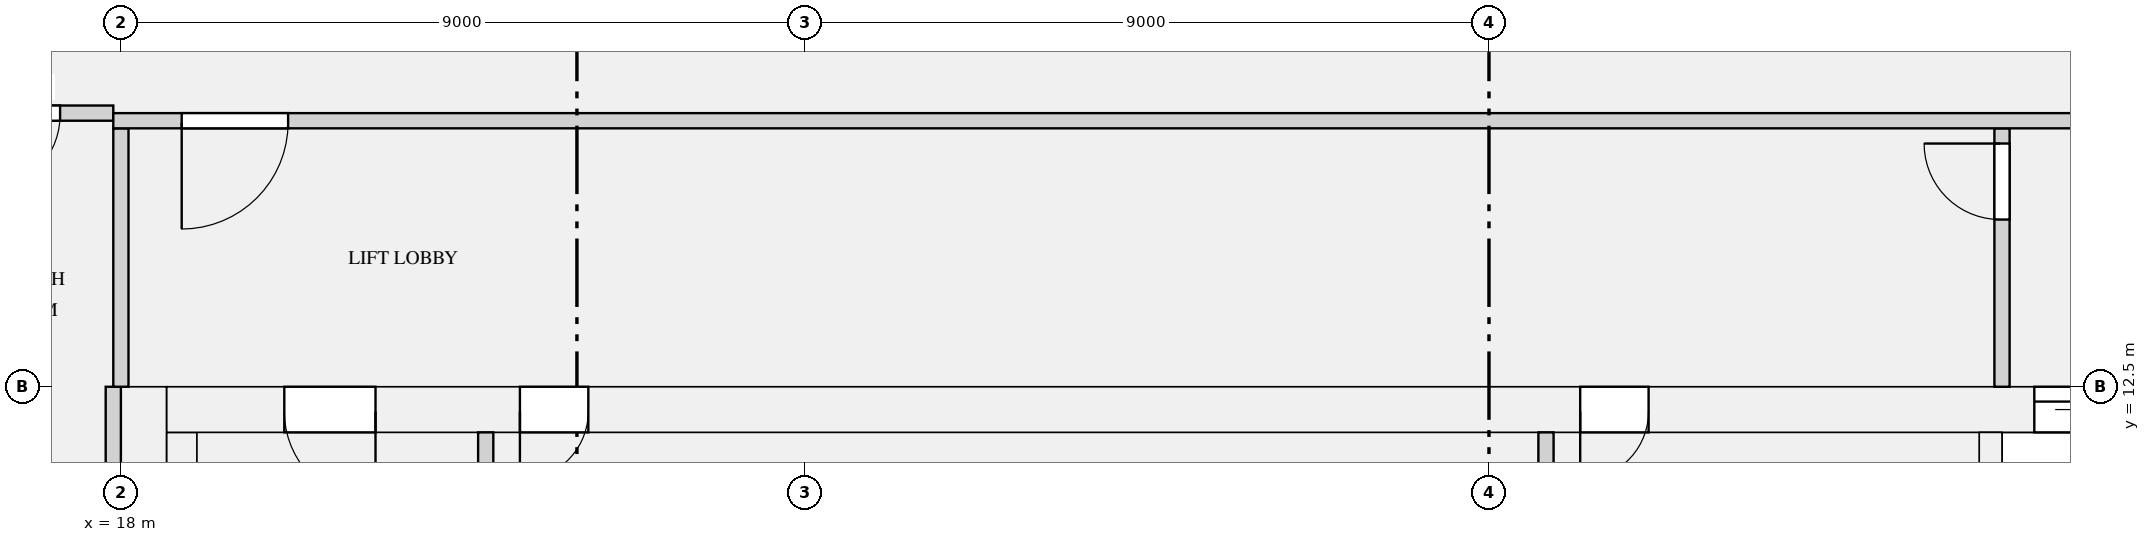
"""IFC4 building model, lengths in metres.
Left out: names, types, materials, properties, quantities, classifications, styles, units other than length and angle.
Written with IfcOpenShell. Run it as: python <this file> out.ifc"""

import sys

from ifc_helpers import new_model, si_unit, direction, frame, frame_2d, origin, place, context, subcontext, project, spatial, rectangle, extrude, element, fill, save


model = new_model("IFC4")
c1 = context("Model", 3, precision=1e-05, world=origin(), true_north=direction((0.0, 1.0)))
c2 = subcontext(c1, "Body", "Model", "MODEL_VIEW")
j1 = project(units=[si_unit("LENGTHUNIT", "METRE"), si_unit("PLANEANGLEUNIT", "RADIAN")], contexts=[c1])
p1 = place(None, origin())
s1 = spatial("IfcSite", under=j1, at=p1, CompositionType="ELEMENT")
p2 = place(p1, origin())
s2 = spatial("IfcBuilding", under=s1, at=p2, CompositionType="ELEMENT")
p3 = place(p2, frame((0.0, 0.0, 235.8)))
s3 = spatial("IfcBuildingStorey", under=s2, at=p3, CompositionType="ELEMENT", Elevation=235.8)
p4 = place(p3, frame((18.3, 0.0, 0.0), z_axis=(0.0, 0.0, 1.0), x_axis=(0.0, 1.0, 0.0)))
e1 = element("IfcWall", 1, at=p4, inside=s3, PredefinedType="SHEAR", context=c2, shape_type="SweptSolid", body=[
    extrude(rectangle(XDim=12.5, YDim=0.6, at=frame_2d((6.25, 0.0))), origin(), (0.0, 0.0, 1.0), 4.2),
])
p5 = place(p3, frame((18.6, 12.2, 0.0), z_axis=(0.0, 0.0, 1.0), x_axis=(1.0, 0.0, 0.0)))
e2 = element("IfcWall", 2, at=p5, inside=s3, PredefinedType="SHEAR", context=c2, shape_type="SweptSolid", body=[
    extrude(rectangle(XDim=34.8, YDim=0.6, at=frame_2d((17.4, 0.0))), origin(), (0.0, 0.0, 1.0), 4.2),
])
p6 = place(p5, frame((24.575, 0.0, 0.0)))
e3 = element("IfcOpeningElement", 3, at=p6, cuts=e2, PredefinedType="OPENING", context=c2, shape_type="SweptSolid", body=[
    extrude(rectangle(XDim=1.1, YDim=2.1, at=frame_2d((0.55, 1.05))), frame((0.0, 0.31, 0.0), z_axis=(0.0, -1.0, 0.0), x_axis=(1.0, 0.0, 0.0)), (0.0, 0.0, 1.0), 0.62),
])
p7 = place(p5, frame((26.825, 0.0, 0.0)))
e4 = element("IfcOpeningElement", 4, at=p7, cuts=e2, PredefinedType="OPENING", context=c2, shape_type="SweptSolid", body=[
    extrude(rectangle(XDim=1.1, YDim=2.1, at=frame_2d((0.55, 1.05))), frame((0.0, 0.31, 0.0), z_axis=(0.0, -1.0, 0.0), x_axis=(1.0, 0.0, 0.0)), (0.0, 0.0, 1.0), 0.62),
])
p8 = place(p5, frame((29.075, 0.0, 0.0)))
e5 = element("IfcOpeningElement", 5, at=p8, cuts=e2, PredefinedType="OPENING", context=c2, shape_type="SweptSolid", body=[
    extrude(rectangle(XDim=1.1, YDim=2.1, at=frame_2d((0.55, 1.05))), frame((0.0, 0.31, 0.0), z_axis=(0.0, -1.0, 0.0), x_axis=(1.0, 0.0, 0.0)), (0.0, 0.0, 1.0), 0.62),
])
p9 = place(p5, frame((18.6, 0.0, 0.0)))
e6 = element("IfcOpeningElement", 6, at=p9, cuts=e2, PredefinedType="OPENING", context=c2, shape_type="SweptSolid", body=[
    extrude(rectangle(XDim=0.9, YDim=2.1, at=frame_2d((0.45, 1.05))), frame((0.0, 0.31, 0.0), z_axis=(0.0, -1.0, 0.0), x_axis=(1.0, 0.0, 0.0)), (0.0, 0.0, 1.0), 0.62),
])
p10 = place(p5, frame((4.65, 0.0, 0.0)))
e7 = element("IfcOpeningElement", 7, at=p10, cuts=e2, PredefinedType="OPENING", context=c2, shape_type="SweptSolid", body=[
    extrude(rectangle(XDim=0.9, YDim=2.1, at=frame_2d((0.45, 1.05))), frame((0.0, 0.31, 0.0), z_axis=(0.0, -1.0, 0.0), x_axis=(1.0, 0.0, 0.0)), (0.0, 0.0, 1.0), 0.62),
])
p11 = place(p5, frame((1.55, 0.0, 0.0)))
e8 = element("IfcOpeningElement", 8, at=p11, cuts=e2, PredefinedType="OPENING", context=c2, shape_type="SweptSolid", body=[
    extrude(rectangle(XDim=1.2, YDim=2.1, at=frame_2d((0.6, 1.05))), frame((0.0, 0.31, 0.0), z_axis=(0.0, -1.0, 0.0), x_axis=(1.0, 0.0, 0.0)), (0.0, 0.0, 1.0), 0.62),
])
p12 = place(p5, frame((32.05, 0.0, 0.0)))
e9 = element("IfcOpeningElement", 9, at=p12, cuts=e2, PredefinedType="OPENING", context=c2, shape_type="SweptSolid", body=[
    extrude(rectangle(XDim=1.2, YDim=2.1, at=frame_2d((0.6, 1.05))), frame((0.0, 0.31, 0.0), z_axis=(0.0, -1.0, 0.0), x_axis=(1.0, 0.0, 0.0)), (0.0, 0.0, 1.0), 0.62),
])
p13 = place(p3, frame((18.8, 1.0, 0.0), z_axis=(0.0, 0.0, 1.0), x_axis=(0.0, 1.0, 0.0)))
e10 = element("IfcWall", 10, at=p13, inside=s3, PredefinedType="SHEAR", context=c2, shape_type="SweptSolid", body=[
    extrude(rectangle(XDim=10.9, YDim=0.4, at=frame_2d((5.45, 0.0))), origin(), (0.0, 0.0, 1.0), 4.2),
])
p14 = place(p3, frame((42.6, 8.25, 0.0), z_axis=(0.0, 0.0, 1.0), x_axis=(0.0, 1.0, 0.0)))
e11 = element("IfcWall", 11, at=p14, inside=s3, PredefinedType="SHEAR", context=c2, shape_type="SweptSolid", body=[
    extrude(rectangle(XDim=3.65, YDim=0.3, at=frame_2d((1.825, 0.0))), origin(), (0.0, 0.0, 1.0), 4.2),
])
for number, where, z_axis, x_axis in (
    (12, (22.8, 9.75, 0.0), (0.0, 0.0, 1.0), (0.0, 1.0, 0.0)),
    (13, (36.75, 9.75, 0.0), (0.0, 0.0, 1.0), (0.0, 1.0, 0.0)),
):
    element("IfcWall", number, at=place(p3, frame(where, z_axis=z_axis, x_axis=x_axis)), inside=s3, PredefinedType="PARTITIONING", context=c2, shape_type="SweptSolid", body=[
        extrude(rectangle(XDim=2.15, YDim=0.2, at=frame_2d((1.075, 0.0))), origin(), (0.0, 0.0, 1.0), 3.85),
    ])
p15 = place(p3, frame((18.0, 12.5, 0.0), z_axis=(0.0, 0.0, 1.0), x_axis=(0.0, 1.0, 0.0)))
e14 = element("IfcWall", 14, at=p15, inside=s3, PredefinedType="PARTITIONING", context=c2, shape_type="SweptSolid", body=[
    extrude(rectangle(XDim=3.4, YDim=0.2, at=frame_2d((1.7, 0.0))), origin(), (0.0, 0.0, 1.0), 3.85),
])
p16 = place(p3, frame((42.75, 12.5, 0.0), z_axis=(0.0, 0.0, 1.0), x_axis=(0.0, 1.0, 0.0)))
e15 = element("IfcWall", 15, at=p16, inside=s3, PredefinedType="PARTITIONING", context=c2, shape_type="SweptSolid", body=[
    extrude(rectangle(XDim=3.4, YDim=0.2, at=frame_2d((1.7, 0.0))), origin(), (0.0, 0.0, 1.0), 3.85),
])
p17 = place(p16, frame((2.2, 0.0, 0.0)))
e16 = element("IfcOpeningElement", 16, at=p17, cuts=e15, PredefinedType="OPENING", context=c2, shape_type="SweptSolid", body=[
    extrude(rectangle(XDim=1.0, YDim=2.1, at=frame_2d((0.5, 1.05))), frame((0.0, 0.11, 0.0), z_axis=(0.0, -1.0, 0.0), x_axis=(1.0, 0.0, 0.0)), (0.0, 0.0, 1.0), 0.22),
])
p18 = place(p3, frame((17.9, 16.0, 0.0), z_axis=(0.0, 0.0, 1.0), x_axis=(1.0, 0.0, 0.0)))
e17 = element("IfcWall", 17, at=p18, inside=s3, PredefinedType="PARTITIONING", context=c2, shape_type="SweptSolid", body=[
    extrude(rectangle(XDim=36.2, YDim=0.2, at=frame_2d((18.1, 0.0))), origin(), (0.0, 0.0, 1.0), 3.85),
])
p19 = place(p18, frame((0.9, 0.0, 0.0)))
e18 = element("IfcOpeningElement", 18, at=p19, cuts=e17, PredefinedType="OPENING", context=c2, shape_type="SweptSolid", body=[
    extrude(rectangle(XDim=1.4, YDim=2.1, at=frame_2d((0.7, 1.05))), frame((0.0, 0.11, 0.0), z_axis=(0.0, -1.0, 0.0), x_axis=(1.0, 0.0, 0.0)), (0.0, 0.0, 1.0), 0.22),
])
p20 = place(p18, frame((33.9, 0.0, 0.0)))
e19 = element("IfcOpeningElement", 19, at=p20, cuts=e17, PredefinedType="OPENING", context=c2, shape_type="SweptSolid", body=[
    extrude(rectangle(XDim=1.4, YDim=2.1, at=frame_2d((0.7, 1.05))), frame((0.0, 0.11, 0.0), z_axis=(0.0, -1.0, 0.0), x_axis=(1.0, 0.0, 0.0)), (0.0, 0.0, 1.0), 0.22),
])
p21 = place(p3, frame((11.95, 16.1, 0.0), z_axis=(0.0, 0.0, 1.0), x_axis=(1.0, 0.0, 0.0)))
e20 = element("IfcWall", 20, at=p21, inside=s3, PredefinedType="PARTITIONING", context=c2, shape_type="SweptSolid", body=[
    extrude(rectangle(XDim=5.95, YDim=0.2, at=frame_2d((2.975, 0.0))), origin(), (0.0, 0.0, 1.0), 3.85),
])
p22 = place(p21, frame((1.4, 0.0, 0.0)))
e21 = element("IfcOpeningElement", 21, at=p22, cuts=e20, PredefinedType="OPENING", context=c2, shape_type="SweptSolid", body=[
    extrude(rectangle(XDim=1.8, YDim=2.1, at=frame_2d((0.9, 1.05))), frame((0.0, 0.11, 0.0), z_axis=(0.0, -1.0, 0.0), x_axis=(1.0, 0.0, 0.0)), (0.0, 0.0, 1.0), 0.22),
])
p23 = place(p21, frame((4.25, 0.0, 0.0)))
e22 = element("IfcOpeningElement", 22, at=p23, cuts=e20, PredefinedType="OPENING", context=c2, shape_type="SweptSolid", body=[
    extrude(rectangle(XDim=1.0, YDim=2.1, at=frame_2d((0.5, 1.05))), frame((0.0, 0.11, 0.0), z_axis=(0.0, -1.0, 0.0), x_axis=(1.0, 0.0, 0.0)), (0.0, 0.0, 1.0), 0.22),
])
p24 = place(p3, frame((17.9, 0.65, 0.0), z_axis=(0.0, 0.0, 1.0), x_axis=(0.0, 1.0, 0.0)))
e23 = element("IfcWall", 23, at=p24, inside=s3, PredefinedType="PARTITIONING", context=c2, shape_type="SweptSolid", body=[
    extrude(rectangle(XDim=11.85, YDim=0.2, at=frame_2d((5.925, 0.0))), origin(), (0.0, 0.0, 1.0), 3.85),
])
p25 = place(p6, origin())
e24 = element("IfcDoor", 24, at=p25, inside=s3, OperationType="DOUBLE_DOOR_SLIDING", PredefinedType="DOOR", context=c2, shape_type="SweptSolid", body=[
    extrude(rectangle(XDim=1.1, YDim=2.1, at=frame_2d((0.55, 1.05))), frame((0.0, 0.025, 0.0), z_axis=(0.0, -1.0, 0.0), x_axis=(1.0, 0.0, 0.0)), (0.0, 0.0, 1.0), 0.05),
])
fill(e3, e24)
p26 = place(p9, frame((0.9, 0.0, 0.0), z_axis=(0.0, 0.0, 1.0), x_axis=(-1.0, 0.0, 0.0)))
e25 = element("IfcDoor", 25, at=p26, inside=s3, OperationType="SINGLE_SWING_RIGHT", PredefinedType="DOOR", context=c2, shape_type="SweptSolid", body=[
    extrude(rectangle(XDim=0.9, YDim=2.1, at=frame_2d((0.45, 1.05))), frame((0.0, 0.025, 0.0), z_axis=(0.0, -1.0, 0.0), x_axis=(1.0, 0.0, 0.0)), (0.0, 0.0, 1.0), 0.05),
])
fill(e6, e25)
p27 = place(p10, frame((0.9, 0.0, 0.0), z_axis=(0.0, 0.0, 1.0), x_axis=(-1.0, 0.0, 0.0)))
e26 = element("IfcDoor", 26, at=p27, inside=s3, OperationType="SINGLE_SWING_RIGHT", PredefinedType="DOOR", context=c2, shape_type="SweptSolid", body=[
    extrude(rectangle(XDim=0.9, YDim=2.1, at=frame_2d((0.45, 1.05))), frame((0.0, 0.025, 0.0), z_axis=(0.0, -1.0, 0.0), x_axis=(1.0, 0.0, 0.0)), (0.0, 0.0, 1.0), 0.05),
])
fill(e7, e26)
p28 = place(p11, frame((1.2, 0.0, 0.0), z_axis=(0.0, 0.0, 1.0), x_axis=(-1.0, 0.0, 0.0)))
e27 = element("IfcDoor", 27, at=p28, inside=s3, OperationType="SINGLE_SWING_LEFT", PredefinedType="DOOR", context=c2, shape_type="SweptSolid", body=[
    extrude(rectangle(XDim=1.2, YDim=2.1, at=frame_2d((0.6, 1.05))), frame((0.0, 0.025, 0.0), z_axis=(0.0, -1.0, 0.0), x_axis=(1.0, 0.0, 0.0)), (0.0, 0.0, 1.0), 0.05),
])
fill(e8, e27)
p29 = place(p17, origin())
e28 = element("IfcDoor", 28, at=p29, inside=s3, OperationType="SINGLE_SWING_RIGHT", PredefinedType="DOOR", context=c2, shape_type="SweptSolid", body=[
    extrude(rectangle(XDim=1.0, YDim=2.1, at=frame_2d((0.5, 1.05))), frame((0.0, 0.025, 0.0), z_axis=(0.0, -1.0, 0.0), x_axis=(1.0, 0.0, 0.0)), (0.0, 0.0, 1.0), 0.05),
])
fill(e16, e28)
p30 = place(p19, frame((1.4, 0.0, 0.0), z_axis=(0.0, 0.0, 1.0), x_axis=(-1.0, 0.0, 0.0)))
e29 = element("IfcDoor", 29, at=p30, inside=s3, OperationType="SINGLE_SWING_RIGHT", PredefinedType="DOOR", context=c2, shape_type="SweptSolid", body=[
    extrude(rectangle(XDim=1.4, YDim=2.1, at=frame_2d((0.7, 1.05))), frame((0.0, 0.025, 0.0), z_axis=(0.0, -1.0, 0.0), x_axis=(1.0, 0.0, 0.0)), (0.0, 0.0, 1.0), 0.05),
])
fill(e18, e29)
p31 = place(p23, frame((1.0, 0.0, 0.0), z_axis=(0.0, 0.0, 1.0), x_axis=(-1.0, 0.0, 0.0)))
e30 = element("IfcDoor", 30, at=p31, inside=s3, OperationType="SINGLE_SWING_RIGHT", PredefinedType="DOOR", context=c2, shape_type="SweptSolid", body=[
    extrude(rectangle(XDim=1.0, YDim=2.1, at=frame_2d((0.5, 1.05))), frame((0.0, 0.025, 0.0), z_axis=(0.0, -1.0, 0.0), x_axis=(1.0, 0.0, 0.0)), (0.0, 0.0, 1.0), 0.05),
])
fill(e22, e30)
save(model, sys.argv[1])
